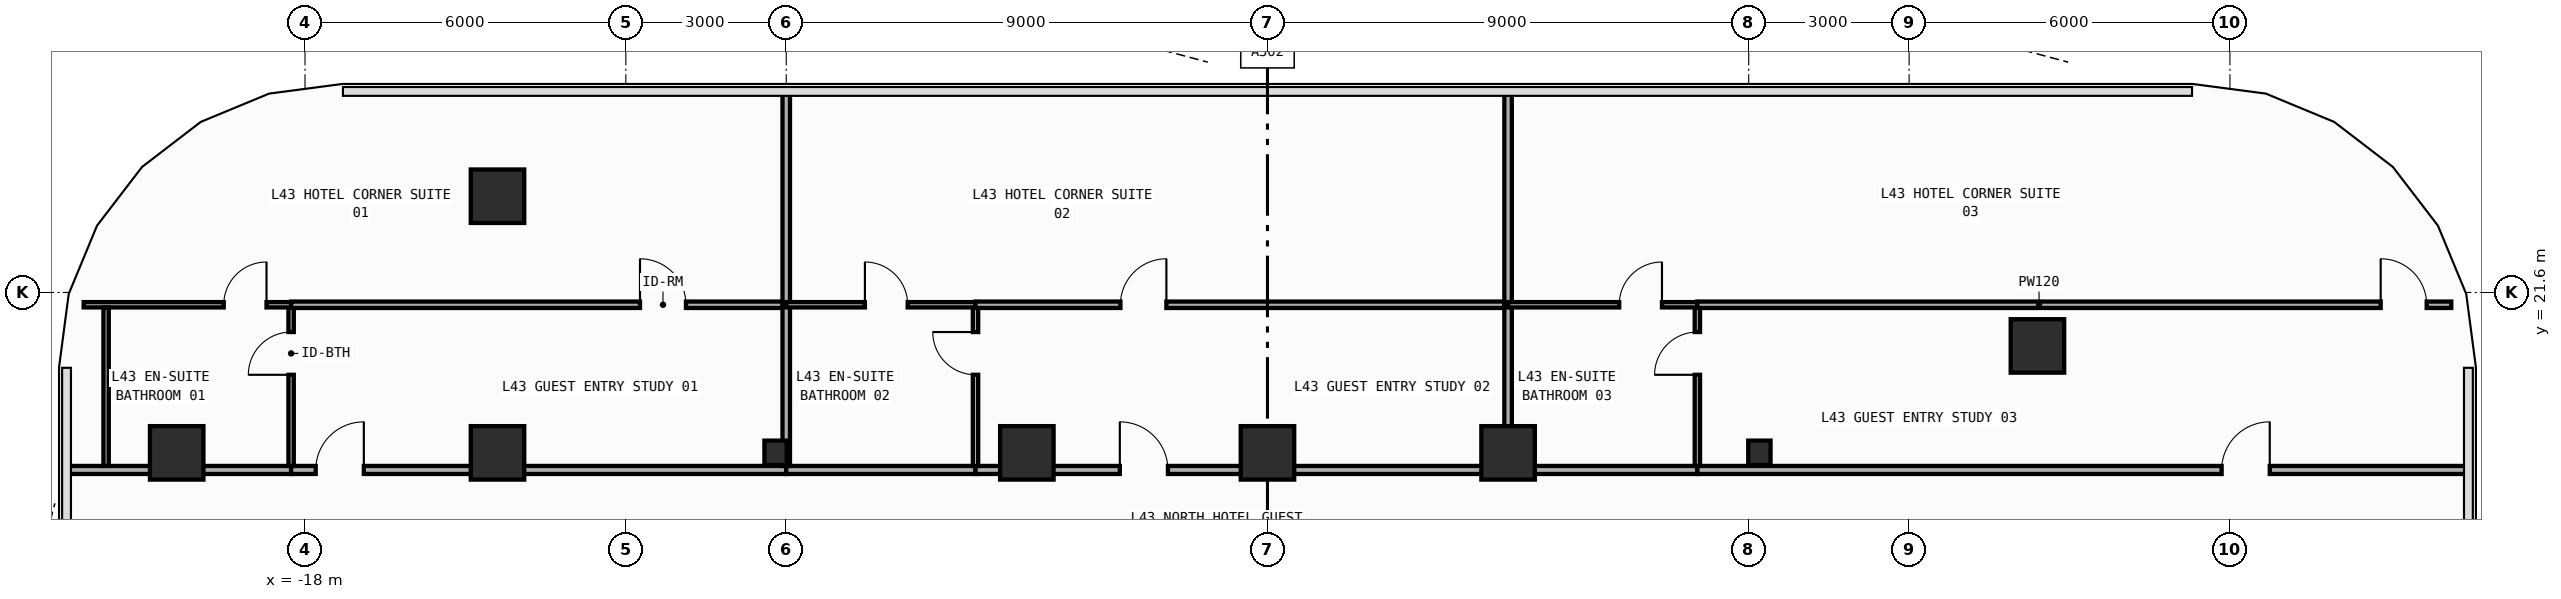
"""IFC4 building model, lengths in metres.
Left out: names, types, materials, properties, quantities, classifications, styles, units other than length and angle.
Written with IfcOpenShell. Run it as: python <this file> out.ifc"""

import sys

from ifc_helpers import new_model, si_unit, direction, frame, frame_2d, origin, origin_2d, place, context, subcontext, project, spatial, rectangle, i_section, extrude, element, fill, save


model = new_model("IFC4")
c1 = context("Model", 3, precision=1e-05, world=origin(), true_north=direction((0.0, 1.0)))
c2 = subcontext(c1, "Body", "Model", "MODEL_VIEW")
j1 = project(units=[si_unit("LENGTHUNIT", "METRE"), si_unit("PLANEANGLEUNIT", "RADIAN")], contexts=[c1])
p1 = place(None, origin())
s1 = spatial("IfcSite", under=j1, at=p1, CompositionType="ELEMENT")
p2 = place(p1, origin())
s2 = spatial("IfcBuilding", under=s1, at=p2, CompositionType="ELEMENT")
p3 = place(p2, frame((0.0, 0.0, 187.8)))
s3 = spatial("IfcBuildingStorey", under=s2, at=p3, CompositionType="ELEMENT", Elevation=187.8)
for number, where, z_axis, x_axis in (
    (1, (-9.2, 18.6, 0.0), (0.0, 0.0, 1.0), (1.0, 0.0, 0.0)),
    (2, (9.2, 18.6, 0.0), (0.0, 0.0, 1.0), (1.0, 0.0, 0.0)),
):
    element("IfcColumn", number, at=place(p3, frame(where, z_axis=z_axis, x_axis=x_axis)), inside=s3, PredefinedType="COLUMN", context=c2, shape_type="SweptSolid", body=[
        extrude(i_section(OverallWidth=0.417, OverallDepth=0.458, WebThickness=0.03, FlangeThickness=0.05, FilletRadius=0.022, at=origin_2d()), origin(), (0.0, 0.0, 1.0), 3.8),
    ])
for number, where, z_axis, x_axis in (
    (3, (-20.4, 18.6, 0.0), (0.0, 0.0, 1.0), (1.0, 0.0, 0.0)),
    (4, (-14.4, 18.6, 0.0), (0.0, 0.0, 1.0), (1.0, 0.0, 0.0)),
    (5, (-4.5, 18.6, 0.0), (0.0, 0.0, 1.0), (1.0, 0.0, 0.0)),
    (6, (0.0, 18.6, 0.0), (0.0, 0.0, 1.0), (1.0, 0.0, 0.0)),
    (7, (4.5, 18.6, 0.0), (0.0, 0.0, 1.0), (1.0, 0.0, 0.0)),
    (8, (-14.4, 23.4, 0.0), (0.0, 0.0, 1.0), (1.0, 0.0, 0.0)),
    (9, (14.4, 20.6, 0.0), (0.0, 0.0, 1.0), (1.0, 0.0, 0.0)),
):
    element("IfcColumn", number, at=place(p3, frame(where, z_axis=z_axis, x_axis=x_axis)), inside=s3, PredefinedType="COLUMN", context=c2, shape_type="SweptSolid", body=[
        extrude(rectangle(XDim=1.0, YDim=1.0, at=origin_2d()), origin(), (0.0, 0.0, 1.0), 3.8),
    ])
p4 = place(p3, frame((-22.455, 18.28, 0.0), z_axis=(0.0, 0.0, 1.0), x_axis=(1.0, 0.0, 0.0)))
e10 = element("IfcWall", 10, at=p4, inside=s3, PredefinedType="PARTITIONING", context=c2, shape_type="SweptSolid", body=[
    extrude(rectangle(XDim=4.195, YDim=0.15, at=frame_2d((2.098, 0.0))), origin(), (0.0, 0.0, 1.0), 2.952),
])
p5 = place(p3, frame((-18.26, 18.28, 0.0), z_axis=(0.0, 0.0, 1.0), x_axis=(1.0, 0.0, 0.0)))
e11 = element("IfcWall", 11, at=p5, inside=s3, PredefinedType="PARTITIONING", context=c2, shape_type="SweptSolid", body=[
    extrude(rectangle(XDim=9.26, YDim=0.15, at=frame_2d((4.63, 0.0))), origin(), (0.0, 0.0, 1.0), 2.952),
])
p6 = place(p5, frame((0.46, 0.0, 0.0)))
e12 = element("IfcOpeningElement", 12, at=p6, cuts=e11, PredefinedType="OPENING", context=c2, shape_type="SweptSolid", body=[
    extrude(rectangle(XDim=0.9, YDim=2.15, at=frame_2d((0.45, 1.075))), frame((0.0, 0.085, 0.0), z_axis=(0.0, -1.0, 0.0), x_axis=(1.0, 0.0, 0.0)), (0.0, 0.0, 1.0), 0.17),
])
p7 = place(p3, frame((-9.0, 18.28, 0.0), z_axis=(0.0, 0.0, 1.0), x_axis=(1.0, 0.0, 0.0)))
e13 = element("IfcWall", 13, at=p7, inside=s3, PredefinedType="PARTITIONING", context=c2, shape_type="SweptSolid", body=[
    extrude(rectangle(XDim=3.54, YDim=0.15, at=frame_2d((1.77, 0.0))), origin(), (0.0, 0.0, 1.0), 2.952),
])
p8 = place(p3, frame((-5.46, 18.28, 0.0), z_axis=(0.0, 0.0, 1.0), x_axis=(1.0, 0.0, 0.0)))
e14 = element("IfcWall", 14, at=p8, inside=s3, PredefinedType="PARTITIONING", context=c2, shape_type="SweptSolid", body=[
    extrude(rectangle(XDim=9.96, YDim=0.15, at=frame_2d((4.98, 0.0))), origin(), (0.0, 0.0, 1.0), 2.952),
])
p9 = place(p8, frame((2.698, 0.0, 0.0)))
e15 = element("IfcOpeningElement", 15, at=p9, cuts=e14, PredefinedType="OPENING", context=c2, shape_type="SweptSolid", body=[
    extrude(rectangle(XDim=0.9, YDim=2.15, at=frame_2d((0.45, 1.075))), frame((0.0, 0.085, 0.0), z_axis=(0.0, -1.0, 0.0), x_axis=(1.0, 0.0, 0.0)), (0.0, 0.0, 1.0), 0.17),
])
p10 = place(p3, frame((4.5, 18.28, 0.0), z_axis=(0.0, 0.0, 1.0), x_axis=(1.0, 0.0, 0.0)))
e16 = element("IfcWall", 16, at=p10, inside=s3, PredefinedType="PARTITIONING", context=c2, shape_type="SweptSolid", body=[
    extrude(rectangle(XDim=3.54, YDim=0.15, at=frame_2d((1.77, 0.0))), origin(), (0.0, 0.0, 1.0), 2.952),
])
p11 = place(p3, frame((8.04, 18.28, 0.0), z_axis=(0.0, 0.0, 1.0), x_axis=(1.0, 0.0, 0.0)))
e17 = element("IfcWall", 17, at=p11, inside=s3, PredefinedType="PARTITIONING", context=c2, shape_type="SweptSolid", body=[
    extrude(rectangle(XDim=14.415, YDim=0.15, at=frame_2d((7.208, 0.0))), origin(), (0.0, 0.0, 1.0), 2.952),
])
p12 = place(p11, frame((9.805, 0.0, 0.0)))
e18 = element("IfcOpeningElement", 18, at=p12, cuts=e17, PredefinedType="OPENING", context=c2, shape_type="SweptSolid", body=[
    extrude(rectangle(XDim=0.9, YDim=2.15, at=frame_2d((0.45, 1.075))), frame((0.0, 0.085, 0.0), z_axis=(0.0, -1.0, 0.0), x_axis=(1.0, 0.0, 0.0)), (0.0, 0.0, 1.0), 0.17),
])
p13 = place(p3, frame((-18.26, 18.355, 0.0), z_axis=(0.0, 0.0, 1.0), x_axis=(0.0, 1.0, 0.0)))
e19 = element("IfcWall", 19, at=p13, inside=s3, PredefinedType="PARTITIONING", context=c2, shape_type="SweptSolid", body=[
    extrude(rectangle(XDim=2.965, YDim=0.1, at=frame_2d((1.482, 0.0))), origin(), (0.0, 0.0, 1.0), 3.54),
])
p14 = place(p13, frame((1.705, 0.0, 0.0)))
e20 = element("IfcOpeningElement", 20, at=p14, cuts=e19, PredefinedType="OPENING", context=c2, shape_type="SweptSolid", body=[
    extrude(rectangle(XDim=0.8, YDim=2.1, at=frame_2d((0.4, 1.05))), frame((0.0, 0.06, 0.0), z_axis=(0.0, -1.0, 0.0), x_axis=(1.0, 0.0, 0.0)), (0.0, 0.0, 1.0), 0.12),
])
p15 = place(p3, frame((-22.14, 21.37, 0.0), z_axis=(0.0, 0.0, 1.0), x_axis=(1.0, 0.0, 0.0)))
e21 = element("IfcWall", 21, at=p15, inside=s3, PredefinedType="PARTITIONING", context=c2, shape_type="SweptSolid", body=[
    extrude(rectangle(XDim=3.88, YDim=0.1, at=frame_2d((1.94, 0.0))), origin(), (0.0, 0.0, 1.0), 3.54),
])
p16 = place(p15, frame((2.62, 0.0, 0.0)))
e22 = element("IfcOpeningElement", 22, at=p16, cuts=e21, PredefinedType="OPENING", context=c2, shape_type="SweptSolid", body=[
    extrude(rectangle(XDim=0.8, YDim=2.1, at=frame_2d((0.4, 1.05))), frame((0.0, 0.06, 0.0), z_axis=(0.0, -1.0, 0.0), x_axis=(1.0, 0.0, 0.0)), (0.0, 0.0, 1.0), 0.12),
])
p17 = place(p3, frame((-18.26, 21.37, 0.0), z_axis=(0.0, 0.0, 1.0), x_axis=(1.0, 0.0, 0.0)))
e23 = element("IfcWall", 23, at=p17, inside=s3, PredefinedType="PARTITIONING", context=c2, shape_type="SweptSolid", body=[
    extrude(rectangle(XDim=9.26, YDim=0.12, at=frame_2d((4.63, 0.0))), origin(), (0.0, 0.0, 1.0), 3.54),
])
p18 = place(p17, frame((6.525, 0.0, 0.0)))
e24 = element("IfcOpeningElement", 24, at=p18, cuts=e23, PredefinedType="OPENING", context=c2, shape_type="SweptSolid", body=[
    extrude(rectangle(XDim=0.86, YDim=2.15, at=frame_2d((0.43, 1.075))), frame((0.0, 0.07, 0.0), z_axis=(0.0, -1.0, 0.0), x_axis=(1.0, 0.0, 0.0)), (0.0, 0.0, 1.0), 0.14),
])
p19 = place(p3, frame((-9.0, 18.355, 0.0), z_axis=(0.0, 0.0, 1.0), x_axis=(0.0, 1.0, 0.0)))
e25 = element("IfcWall", 25, at=p19, inside=s3, PredefinedType="PARTITIONING", context=c2, shape_type="SweptSolid", body=[
    extrude(rectangle(XDim=3.015, YDim=0.14, at=frame_2d((1.508, 0.0))), origin(), (0.0, 0.0, 1.0), 2.952),
])
p20 = place(p3, frame((-9.0, 21.37, 0.0), z_axis=(0.0, 0.0, 1.0), x_axis=(0.0, 1.0, 0.0)))
e26 = element("IfcWall", 26, at=p20, inside=s3, PredefinedType="PARTITIONING", context=c2, shape_type="SweptSolid", body=[
    extrude(rectangle(XDim=3.985, YDim=0.14, at=frame_2d((1.992, 0.0))), origin(), (0.0, 0.0, 1.0), 3.54),
])
p21 = place(p3, frame((-5.46, 18.355, 0.0), z_axis=(0.0, 0.0, 1.0), x_axis=(0.0, 1.0, 0.0)))
e27 = element("IfcWall", 27, at=p21, inside=s3, PredefinedType="PARTITIONING", context=c2, shape_type="SweptSolid", body=[
    extrude(rectangle(XDim=2.965, YDim=0.1, at=frame_2d((1.482, 0.0))), origin(), (0.0, 0.0, 1.0), 3.54),
])
p22 = place(p21, frame((1.705, 0.0, 0.0)))
e28 = element("IfcOpeningElement", 28, at=p22, cuts=e27, PredefinedType="OPENING", context=c2, shape_type="SweptSolid", body=[
    extrude(rectangle(XDim=0.8, YDim=2.1, at=frame_2d((0.4, 1.05))), frame((0.0, 0.06, 0.0), z_axis=(0.0, -1.0, 0.0), x_axis=(1.0, 0.0, 0.0)), (0.0, 0.0, 1.0), 0.12),
])
p23 = place(p3, frame((-9.0, 21.37, 0.0), z_axis=(0.0, 0.0, 1.0), x_axis=(1.0, 0.0, 0.0)))
e29 = element("IfcWall", 29, at=p23, inside=s3, PredefinedType="PARTITIONING", context=c2, shape_type="SweptSolid", body=[
    extrude(rectangle(XDim=3.54, YDim=0.1, at=frame_2d((1.77, 0.0))), origin(), (0.0, 0.0, 1.0), 3.54),
])
p24 = place(p23, frame((1.471, 0.0, 0.0)))
e30 = element("IfcOpeningElement", 30, at=p24, cuts=e29, PredefinedType="OPENING", context=c2, shape_type="SweptSolid", body=[
    extrude(rectangle(XDim=0.8, YDim=2.1, at=frame_2d((0.4, 1.05))), frame((0.0, 0.06, 0.0), z_axis=(0.0, -1.0, 0.0), x_axis=(1.0, 0.0, 0.0)), (0.0, 0.0, 1.0), 0.12),
])
p25 = place(p3, frame((-5.46, 21.37, 0.0), z_axis=(0.0, 0.0, 1.0), x_axis=(1.0, 0.0, 0.0)))
e31 = element("IfcWall", 31, at=p25, inside=s3, PredefinedType="PARTITIONING", context=c2, shape_type="SweptSolid", body=[
    extrude(rectangle(XDim=9.96, YDim=0.12, at=frame_2d((4.98, 0.0))), origin(), (0.0, 0.0, 1.0), 3.54),
])
p26 = place(p25, frame((2.709, 0.0, 0.0)))
e32 = element("IfcOpeningElement", 32, at=p26, cuts=e31, PredefinedType="OPENING", context=c2, shape_type="SweptSolid", body=[
    extrude(rectangle(XDim=0.86, YDim=2.15, at=frame_2d((0.43, 1.075))), frame((0.0, 0.07, 0.0), z_axis=(0.0, -1.0, 0.0), x_axis=(1.0, 0.0, 0.0)), (0.0, 0.0, 1.0), 0.14),
])
p27 = place(p3, frame((4.5, 18.355, 0.0), z_axis=(0.0, 0.0, 1.0), x_axis=(0.0, 1.0, 0.0)))
e33 = element("IfcWall", 33, at=p27, inside=s3, PredefinedType="PARTITIONING", context=c2, shape_type="SweptSolid", body=[
    extrude(rectangle(XDim=3.015, YDim=0.14, at=frame_2d((1.508, 0.0))), origin(), (0.0, 0.0, 1.0), 3.54),
])
p28 = place(p3, frame((4.5, 21.37, 0.0), z_axis=(0.0, 0.0, 1.0), x_axis=(0.0, 1.0, 0.0)))
e34 = element("IfcWall", 34, at=p28, inside=s3, PredefinedType="PARTITIONING", context=c2, shape_type="SweptSolid", body=[
    extrude(rectangle(XDim=3.985, YDim=0.14, at=frame_2d((1.992, 0.0))), origin(), (0.0, 0.0, 1.0), 3.54),
])
p29 = place(p3, frame((8.04, 18.355, 0.0), z_axis=(0.0, 0.0, 1.0), x_axis=(0.0, 1.0, 0.0)))
e35 = element("IfcWall", 35, at=p29, inside=s3, PredefinedType="PARTITIONING", context=c2, shape_type="SweptSolid", body=[
    extrude(rectangle(XDim=2.965, YDim=0.1, at=frame_2d((1.482, 0.0))), origin(), (0.0, 0.0, 1.0), 3.54),
])
p30 = place(p29, frame((1.705, 0.0, 0.0)))
e36 = element("IfcOpeningElement", 36, at=p30, cuts=e35, PredefinedType="OPENING", context=c2, shape_type="SweptSolid", body=[
    extrude(rectangle(XDim=0.8, YDim=2.1, at=frame_2d((0.4, 1.05))), frame((0.0, 0.06, 0.0), z_axis=(0.0, -1.0, 0.0), x_axis=(1.0, 0.0, 0.0)), (0.0, 0.0, 1.0), 0.12),
])
p31 = place(p3, frame((4.5, 21.37, 0.0), z_axis=(0.0, 0.0, 1.0), x_axis=(1.0, 0.0, 0.0)))
e37 = element("IfcWall", 37, at=p31, inside=s3, PredefinedType="PARTITIONING", context=c2, shape_type="SweptSolid", body=[
    extrude(rectangle(XDim=3.54, YDim=0.1, at=frame_2d((1.77, 0.0))), origin(), (0.0, 0.0, 1.0), 3.54),
])
p32 = place(p31, frame((2.078, 0.0, 0.0)))
e38 = element("IfcOpeningElement", 38, at=p32, cuts=e37, PredefinedType="OPENING", context=c2, shape_type="SweptSolid", body=[
    extrude(rectangle(XDim=0.8, YDim=2.1, at=frame_2d((0.4, 1.05))), frame((0.0, 0.06, 0.0), z_axis=(0.0, -1.0, 0.0), x_axis=(1.0, 0.0, 0.0)), (0.0, 0.0, 1.0), 0.12),
])
p33 = place(p3, frame((8.04, 21.37, 0.0), z_axis=(0.0, 0.0, 1.0), x_axis=(1.0, 0.0, 0.0)))
e39 = element("IfcWall", 39, at=p33, inside=s3, PredefinedType="PARTITIONING", context=c2, shape_type="SweptSolid", body=[
    extrude(rectangle(XDim=14.1, YDim=0.12, at=frame_2d((7.05, 0.0))), origin(), (0.0, 0.0, 1.0), 3.54),
])
p34 = place(p33, frame((12.78, 0.0, 0.0)))
e40 = element("IfcOpeningElement", 40, at=p34, cuts=e39, PredefinedType="OPENING", context=c2, shape_type="SweptSolid", body=[
    extrude(rectangle(XDim=0.86, YDim=2.15, at=frame_2d((0.43, 1.075))), frame((0.0, 0.07, 0.0), z_axis=(0.0, -1.0, 0.0), x_axis=(1.0, 0.0, 0.0)), (0.0, 0.0, 1.0), 0.14),
])
p35 = place(p3, frame((-21.72, 18.355, 0.0), z_axis=(0.0, 0.0, 1.0), x_axis=(0.0, 1.0, 0.0)))
e41 = element("IfcWall", 41, at=p35, inside=s3, PredefinedType="PARTITIONING", context=c2, shape_type="SweptSolid", body=[
    extrude(rectangle(XDim=2.965, YDim=0.1, at=frame_2d((1.482, 0.0))), origin(), (0.0, 0.0, 1.0), 3.54),
])
p36 = place(p6, origin())
e42 = element("IfcDoor", 42, at=p36, inside=s3, OperationType="SINGLE_SWING_RIGHT", PredefinedType="DOOR", context=c2, shape_type="SweptSolid", body=[
    extrude(rectangle(XDim=0.9, YDim=2.15, at=frame_2d((0.45, 1.075))), frame((0.0, 0.025, 0.0), z_axis=(0.0, -1.0, 0.0), x_axis=(1.0, 0.0, 0.0)), (0.0, 0.0, 1.0), 0.05),
])
fill(e12, e42)
p37 = place(p9, origin())
e43 = element("IfcDoor", 43, at=p37, inside=s3, OperationType="SINGLE_SWING_LEFT", PredefinedType="DOOR", context=c2, shape_type="SweptSolid", body=[
    extrude(rectangle(XDim=0.9, YDim=2.15, at=frame_2d((0.45, 1.075))), frame((0.0, 0.025, 0.0), z_axis=(0.0, -1.0, 0.0), x_axis=(1.0, 0.0, 0.0)), (0.0, 0.0, 1.0), 0.05),
])
fill(e15, e43)
p38 = place(p12, origin())
e44 = element("IfcDoor", 44, at=p38, inside=s3, OperationType="SINGLE_SWING_RIGHT", PredefinedType="DOOR", context=c2, shape_type="SweptSolid", body=[
    extrude(rectangle(XDim=0.9, YDim=2.15, at=frame_2d((0.45, 1.075))), frame((0.0, 0.025, 0.0), z_axis=(0.0, -1.0, 0.0), x_axis=(1.0, 0.0, 0.0)), (0.0, 0.0, 1.0), 0.05),
])
fill(e18, e44)
p39 = place(p14, origin())
e45 = element("IfcDoor", 45, at=p39, inside=s3, OperationType="SINGLE_SWING_LEFT", PredefinedType="DOOR", context=c2, shape_type="SweptSolid", body=[
    extrude(rectangle(XDim=0.8, YDim=2.1, at=frame_2d((0.4, 1.05))), frame((0.0, 0.025, 0.0), z_axis=(0.0, -1.0, 0.0), x_axis=(1.0, 0.0, 0.0)), (0.0, 0.0, 1.0), 0.05),
])
fill(e20, e45)
p40 = place(p16, origin())
e46 = element("IfcDoor", 46, at=p40, inside=s3, OperationType="SINGLE_SWING_RIGHT", PredefinedType="DOOR", context=c2, shape_type="SweptSolid", body=[
    extrude(rectangle(XDim=0.8, YDim=2.1, at=frame_2d((0.4, 1.05))), frame((0.0, 0.025, 0.0), z_axis=(0.0, -1.0, 0.0), x_axis=(1.0, 0.0, 0.0)), (0.0, 0.0, 1.0), 0.05),
])
fill(e22, e46)
p41 = place(p18, origin())
e47 = element("IfcDoor", 47, at=p41, inside=s3, OperationType="SINGLE_SWING_LEFT", PredefinedType="DOOR", context=c2, shape_type="SweptSolid", body=[
    extrude(rectangle(XDim=0.86, YDim=2.15, at=frame_2d((0.43, 1.075))), frame((0.0, 0.025, 0.0), z_axis=(0.0, -1.0, 0.0), x_axis=(1.0, 0.0, 0.0)), (0.0, 0.0, 1.0), 0.05),
])
fill(e24, e47)
p42 = place(p22, origin())
e48 = element("IfcDoor", 48, at=p42, inside=s3, OperationType="SINGLE_SWING_RIGHT", PredefinedType="DOOR", context=c2, shape_type="SweptSolid", body=[
    extrude(rectangle(XDim=0.8, YDim=2.1, at=frame_2d((0.4, 1.05))), frame((0.0, 0.025, 0.0), z_axis=(0.0, -1.0, 0.0), x_axis=(1.0, 0.0, 0.0)), (0.0, 0.0, 1.0), 0.05),
])
fill(e28, e48)
p43 = place(p24, origin())
e49 = element("IfcDoor", 49, at=p43, inside=s3, OperationType="SINGLE_SWING_LEFT", PredefinedType="DOOR", context=c2, shape_type="SweptSolid", body=[
    extrude(rectangle(XDim=0.8, YDim=2.1, at=frame_2d((0.4, 1.05))), frame((0.0, 0.025, 0.0), z_axis=(0.0, -1.0, 0.0), x_axis=(1.0, 0.0, 0.0)), (0.0, 0.0, 1.0), 0.05),
])
fill(e30, e49)
p44 = place(p26, origin())
e50 = element("IfcDoor", 50, at=p44, inside=s3, OperationType="SINGLE_SWING_RIGHT", PredefinedType="DOOR", context=c2, shape_type="SweptSolid", body=[
    extrude(rectangle(XDim=0.86, YDim=2.15, at=frame_2d((0.43, 1.075))), frame((0.0, 0.025, 0.0), z_axis=(0.0, -1.0, 0.0), x_axis=(1.0, 0.0, 0.0)), (0.0, 0.0, 1.0), 0.05),
])
fill(e32, e50)
p45 = place(p30, origin())
e51 = element("IfcDoor", 51, at=p45, inside=s3, OperationType="SINGLE_SWING_LEFT", PredefinedType="DOOR", context=c2, shape_type="SweptSolid", body=[
    extrude(rectangle(XDim=0.8, YDim=2.1, at=frame_2d((0.4, 1.05))), frame((0.0, 0.025, 0.0), z_axis=(0.0, -1.0, 0.0), x_axis=(1.0, 0.0, 0.0)), (0.0, 0.0, 1.0), 0.05),
])
fill(e36, e51)
p46 = place(p32, origin())
e52 = element("IfcDoor", 52, at=p46, inside=s3, OperationType="SINGLE_SWING_RIGHT", PredefinedType="DOOR", context=c2, shape_type="SweptSolid", body=[
    extrude(rectangle(XDim=0.8, YDim=2.1, at=frame_2d((0.4, 1.05))), frame((0.0, 0.025, 0.0), z_axis=(0.0, -1.0, 0.0), x_axis=(1.0, 0.0, 0.0)), (0.0, 0.0, 1.0), 0.05),
])
fill(e38, e52)
p47 = place(p34, origin())
e53 = element("IfcDoor", 53, at=p47, inside=s3, OperationType="SINGLE_SWING_LEFT", PredefinedType="DOOR", context=c2, shape_type="SweptSolid", body=[
    extrude(rectangle(XDim=0.86, YDim=2.15, at=frame_2d((0.43, 1.075))), frame((0.0, 0.025, 0.0), z_axis=(0.0, -1.0, 0.0), x_axis=(1.0, 0.0, 0.0)), (0.0, 0.0, 1.0), 0.05),
])
fill(e40, e53)
save(model, sys.argv[1])
